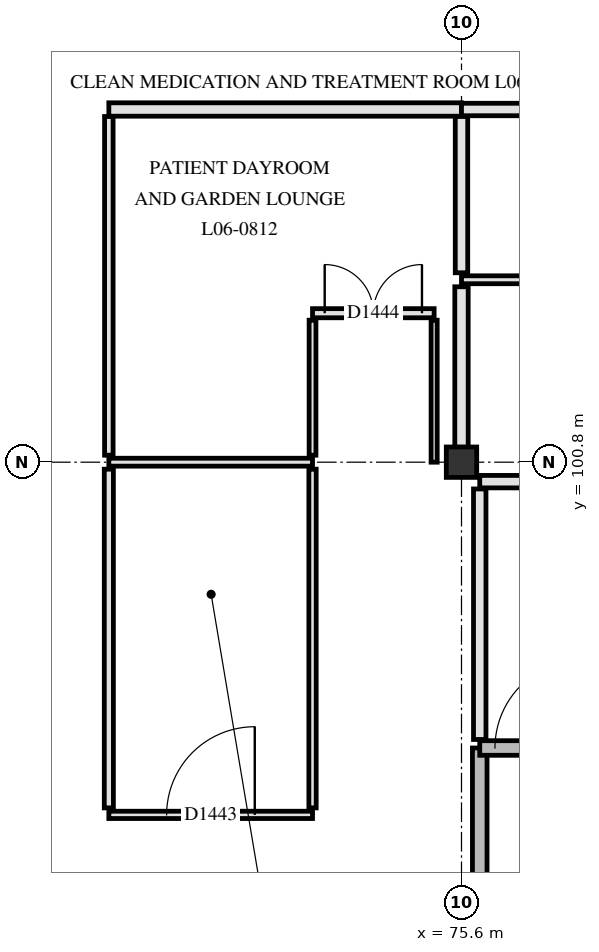
"""IFC4 building model, lengths in metres.
Left out: names, types, materials, properties, quantities, classifications, styles, units other than length and angle.
Written with IfcOpenShell. Run it as: python <this file> out.ifc"""

import sys

from ifc_helpers import new_model, si_unit, direction, frame, frame_2d, origin, origin_2d, place, context, subcontext, project, spatial, rectangle, extrude, element, fill, save


model = new_model("IFC4")
c1 = context("Model", 3, precision=1e-05, world=origin(), true_north=direction((0.0, 1.0)))
c2 = subcontext(c1, "Body", "Model", "MODEL_VIEW")
j1 = project(units=[si_unit("LENGTHUNIT", "METRE"), si_unit("PLANEANGLEUNIT", "RADIAN")], contexts=[c1])
p1 = place(None, origin())
s1 = spatial("IfcSite", under=j1, at=p1, CompositionType="ELEMENT")
p2 = place(p1, origin())
s2 = spatial("IfcBuilding", under=s1, at=p2, CompositionType="ELEMENT")
p3 = place(p2, frame((0.0, 0.0, 26.4)))
s3 = spatial("IfcBuildingStorey", under=s2, at=p3, CompositionType="ELEMENT", Elevation=26.4)
p4 = place(p3, frame((75.6, 100.8, 0.0), z_axis=(0.0, 0.0, 1.0), x_axis=(1.0, 0.0, 0.0)))
e1 = element("IfcColumn", 1, at=p4, inside=s3, PredefinedType="COLUMN", context=c2, shape_type="SweptSolid", body=[
    extrude(rectangle(XDim=0.5, YDim=0.5, at=origin_2d()), origin(), (0.0, 0.0, 1.0), 3.9),
])
p5 = place(p3, frame((75.9, 92.78, 0.0), z_axis=(0.0, 0.0, 1.0), x_axis=(0.0, 1.0, 0.0)))
e2 = element("IfcWall", 2, at=p5, inside=s3, PredefinedType="SHEAR", context=c2, shape_type="SweptSolid", body=[
    extrude(rectangle(XDim=3.32, YDim=0.24, at=frame_2d((1.66, 0.0))), origin(), (0.0, 0.0, 1.0), 3.62),
])
p6 = place(p3, frame((75.9, 96.1, 0.0), z_axis=(0.0, 0.0, 1.0), x_axis=(1.0, 0.0, 0.0)))
e3 = element("IfcWall", 3, at=p6, inside=s3, PredefinedType="SHEAR", context=c2, shape_type="SweptSolid", body=[
    extrude(rectangle(XDim=7.82, YDim=0.24, at=frame_2d((3.91, 0.0))), origin(), (0.0, 0.0, 1.0), 3.62),
])
p7 = place(p6, frame((0.25, 0.0, 0.0)))
e4 = element("IfcOpeningElement", 4, at=p7, cuts=e3, PredefinedType="OPENING", context=c2, shape_type="SweptSolid", body=[
    extrude(rectangle(XDim=1.45, YDim=2.2, at=frame_2d((0.725, 1.1))), frame((0.0, 0.13, 0.0), z_axis=(0.0, -1.0, 0.0), x_axis=(1.0, 0.0, 0.0)), (0.0, 0.0, 1.0), 0.26),
])
p8 = place(p3, frame((75.9, 96.24, 0.0), z_axis=(0.0, 0.0, 1.0), x_axis=(0.0, 1.0, 0.0)))
e5 = element("IfcWall", 5, at=p8, inside=s3, PredefinedType="PARTITIONING", context=c2, shape_type="SweptSolid", body=[
    extrude(rectangle(XDim=4.12, YDim=0.205, at=frame_2d((2.06, 0.0))), origin(), (0.0, 0.0, 1.0), 3.61),
])
p9 = place(p3, frame((75.9, 100.48, 0.0), z_axis=(0.0, 0.0, 1.0), x_axis=(1.0, 0.0, 0.0)))
e6 = element("IfcWall", 6, at=p9, inside=s3, PredefinedType="PARTITIONING", context=c2, shape_type="SweptSolid", body=[
    extrude(rectangle(XDim=4.18, YDim=0.205, at=frame_2d((2.09, 0.0))), origin(), (0.0, 0.0, 1.0), 3.61),
])
p10 = place(p9, frame((1.29, 0.0, 0.0)))
e7 = element("IfcOpeningElement", 7, at=p10, cuts=e6, PredefinedType="OPENING", context=c2, shape_type="SweptSolid", body=[
    extrude(rectangle(XDim=1.6, YDim=2.25, at=frame_2d((0.8, 1.125))), frame((0.0, 0.113, 0.0), z_axis=(0.0, -1.0, 0.0), x_axis=(1.0, 0.0, 0.0)), (0.0, 0.0, 1.0), 0.225),
])
p11 = place(p3, frame((69.8, 95.0, 0.0), z_axis=(0.0, 0.0, 1.0), x_axis=(1.0, 0.0, 0.0)))
e8 = element("IfcWall", 8, at=p11, inside=s3, PredefinedType="PARTITIONING", context=c2, shape_type="SweptSolid", body=[
    extrude(rectangle(XDim=3.35, YDim=0.12, at=frame_2d((1.675, 0.0))), origin(), (0.0, 0.0, 1.0), 3.61),
])
p12 = place(p11, frame((0.95, 0.0, 0.0)))
e9 = element("IfcOpeningElement", 9, at=p12, cuts=e8, PredefinedType="OPENING", context=c2, shape_type="SweptSolid", body=[
    extrude(rectangle(XDim=1.45, YDim=2.2, at=frame_2d((0.725, 1.1))), frame((0.0, 0.07, 0.0), z_axis=(0.0, -1.0, 0.0), x_axis=(1.0, 0.0, 0.0)), (0.0, 0.0, 1.0), 0.14),
])
p13 = place(p3, frame((69.8, 100.8, 0.0), z_axis=(0.0, 0.0, 1.0), x_axis=(1.0, 0.0, 0.0)))
e10 = element("IfcWall", 10, at=p13, inside=s3, PredefinedType="PARTITIONING", context=c2, shape_type="SweptSolid", body=[
    extrude(rectangle(XDim=3.35, YDim=0.13, at=frame_2d((1.675, 0.0))), origin(), (0.0, 0.0, 1.0), 3.21),
])
p14 = place(p3, frame((73.15, 103.25, 0.0), z_axis=(0.0, 0.0, 1.0), x_axis=(1.0, 0.0, 0.0)))
e11 = element("IfcWall", 11, at=p14, inside=s3, PredefinedType="PARTITIONING", context=c2, shape_type="SweptSolid", body=[
    extrude(rectangle(XDim=2.0, YDim=0.15, at=frame_2d((1.0, 0.0))), origin(), (0.0, 0.0, 1.0), 3.61),
])
p15 = place(p14, frame((0.2, 0.0, 0.0)))
e12 = element("IfcOpeningElement", 12, at=p15, cuts=e11, PredefinedType="OPENING", context=c2, shape_type="SweptSolid", body=[
    extrude(rectangle(XDim=1.6, YDim=2.25, at=frame_2d((0.8, 1.125))), frame((0.0, 0.085, 0.0), z_axis=(0.0, -1.0, 0.0), x_axis=(1.0, 0.0, 0.0)), (0.0, 0.0, 1.0), 0.17),
])
p16 = place(p3, frame((75.6, 103.8, 0.0), z_axis=(0.0, 0.0, 1.0), x_axis=(1.0, 0.0, 0.0)))
e13 = element("IfcWall", 13, at=p16, inside=s3, PredefinedType="PARTITIONING", context=c2, shape_type="SweptSolid", body=[
    extrude(rectangle(XDim=4.4, YDim=0.13, at=frame_2d((2.2, 0.0))), origin(), (0.0, 0.0, 1.0), 3.21),
])
p17 = place(p16, frame((1.25, 0.0, 0.0)))
e14 = element("IfcOpeningElement", 14, at=p17, cuts=e13, PredefinedType="OPENING", context=c2, shape_type="SweptSolid", body=[
    extrude(rectangle(XDim=1.9, YDim=2.3, at=frame_2d((0.95, 1.15))), frame((0.0, 0.075, 0.0), z_axis=(0.0, -1.0, 0.0), x_axis=(1.0, 0.0, 0.0)), (0.0, 0.0, 1.0), 0.15),
])
p18 = place(p3, frame((69.8, 106.6, 0.0), z_axis=(0.0, 0.0, 1.0), x_axis=(1.0, 0.0, 0.0)))
e15 = element("IfcWall", 15, at=p18, inside=s3, PredefinedType="PARTITIONING", context=c2, shape_type="SweptSolid", body=[
    extrude(rectangle(XDim=5.8, YDim=0.22, at=frame_2d((2.9, 0.0))), origin(), (0.0, 0.0, 1.0), 3.21),
])
p19 = place(p3, frame((75.6, 106.6, 0.0), z_axis=(0.0, 0.0, 1.0), x_axis=(1.0, 0.0, 0.0)))
e16 = element("IfcWall", 16, at=p19, inside=s3, PredefinedType="PARTITIONING", context=c2, shape_type="SweptSolid", body=[
    extrude(rectangle(XDim=4.4, YDim=0.205, at=frame_2d((2.2, 0.0))), origin(), (0.0, 0.0, 1.0), 3.21),
])
p20 = place(p3, frame((69.8, 95.115, 0.0), z_axis=(0.0, 0.0, 1.0), x_axis=(0.0, 1.0, 0.0)))
e17 = element("IfcWall", 17, at=p20, inside=s3, PredefinedType="PARTITIONING", context=c2, shape_type="SweptSolid", body=[
    extrude(rectangle(XDim=5.57, YDim=0.15, at=frame_2d((2.785, 0.0))), origin(), (0.0, 0.0, 1.0), 3.34),
])
p21 = place(p3, frame((69.8, 100.915, 0.0), z_axis=(0.0, 0.0, 1.0), x_axis=(0.0, 1.0, 0.0)))
e18 = element("IfcWall", 18, at=p21, inside=s3, PredefinedType="PARTITIONING", context=c2, shape_type="SweptSolid", body=[
    extrude(rectangle(XDim=5.57, YDim=0.14, at=frame_2d((2.785, 0.0))), origin(), (0.0, 0.0, 1.0), 3.34),
])
p22 = place(p3, frame((73.15, 95.115, 0.0), z_axis=(0.0, 0.0, 1.0), x_axis=(0.0, 1.0, 0.0)))
e19 = element("IfcWall", 19, at=p22, inside=s3, PredefinedType="PARTITIONING", context=c2, shape_type="SweptSolid", body=[
    extrude(rectangle(XDim=5.57, YDim=0.12, at=frame_2d((2.785, 0.0))), origin(), (0.0, 0.0, 1.0), 3.34),
])
p23 = place(p3, frame((73.15, 100.915, 0.0), z_axis=(0.0, 0.0, 1.0), x_axis=(0.0, 1.0, 0.0)))
e20 = element("IfcWall", 20, at=p23, inside=s3, PredefinedType="PARTITIONING", context=c2, shape_type="SweptSolid", body=[
    extrude(rectangle(XDim=2.22, YDim=0.112, at=frame_2d((1.11, 0.0))), origin(), (0.0, 0.0, 1.0), 3.61),
])
p24 = place(p3, frame((75.15, 100.8, 0.0), z_axis=(0.0, 0.0, 1.0), x_axis=(0.0, 1.0, 0.0)))
e21 = element("IfcWall", 21, at=p24, inside=s3, PredefinedType="PARTITIONING", context=c2, shape_type="SweptSolid", body=[
    extrude(rectangle(XDim=2.335, YDim=0.1, at=frame_2d((1.167, 0.0))), origin(), (0.0, 0.0, 1.0), 3.21),
])
p25 = place(p3, frame((75.6, 101.045, 0.0), z_axis=(0.0, 0.0, 1.0), x_axis=(0.0, 1.0, 0.0)))
e22 = element("IfcWall", 22, at=p25, inside=s3, PredefinedType="PARTITIONING", context=c2, shape_type="SweptSolid", body=[
    extrude(rectangle(XDim=2.64, YDim=0.22, at=frame_2d((1.32, 0.0))), origin(), (0.0, 0.0, 1.0), 3.21),
])
p26 = place(p3, frame((75.6, 103.915, 0.0), z_axis=(0.0, 0.0, 1.0), x_axis=(0.0, 1.0, 0.0)))
e23 = element("IfcWall", 23, at=p26, inside=s3, PredefinedType="PARTITIONING", context=c2, shape_type="SweptSolid", body=[
    extrude(rectangle(XDim=2.57, YDim=0.205, at=frame_2d((1.285, 0.0))), origin(), (0.0, 0.0, 1.0), 3.21),
])
p27 = place(p7, origin())
e24 = element("IfcDoor", 24, at=p27, inside=s3, OperationType="SINGLE_SWING_RIGHT", PredefinedType="DOOR", context=c2, shape_type="SweptSolid", body=[
    extrude(rectangle(XDim=1.45, YDim=2.2, at=frame_2d((0.725, 1.1))), frame((0.0, 0.025, 0.0), z_axis=(0.0, -1.0, 0.0), x_axis=(1.0, 0.0, 0.0)), (0.0, 0.0, 1.0), 0.05),
])
fill(e4, e24)
p28 = place(p12, origin())
e25 = element("IfcDoor", 25, at=p28, inside=s3, OperationType="SINGLE_SWING_RIGHT", PredefinedType="DOOR", context=c2, shape_type="SweptSolid", body=[
    extrude(rectangle(XDim=1.45, YDim=2.2, at=frame_2d((0.725, 1.1))), frame((0.0, 0.025, 0.0), z_axis=(0.0, -1.0, 0.0), x_axis=(1.0, 0.0, 0.0)), (0.0, 0.0, 1.0), 0.05),
])
fill(e9, e25)
p29 = place(p15, origin())
e26 = element("IfcDoor", 26, at=p29, inside=s3, OperationType="DOUBLE_SWING_LEFT", PredefinedType="DOOR", context=c2, shape_type="SweptSolid", body=[
    extrude(rectangle(XDim=1.6, YDim=2.25, at=frame_2d((0.8, 1.125))), frame((0.0, 0.025, 0.0), z_axis=(0.0, -1.0, 0.0), x_axis=(1.0, 0.0, 0.0)), (0.0, 0.0, 1.0), 0.05),
])
fill(e12, e26)
save(model, sys.argv[1])
